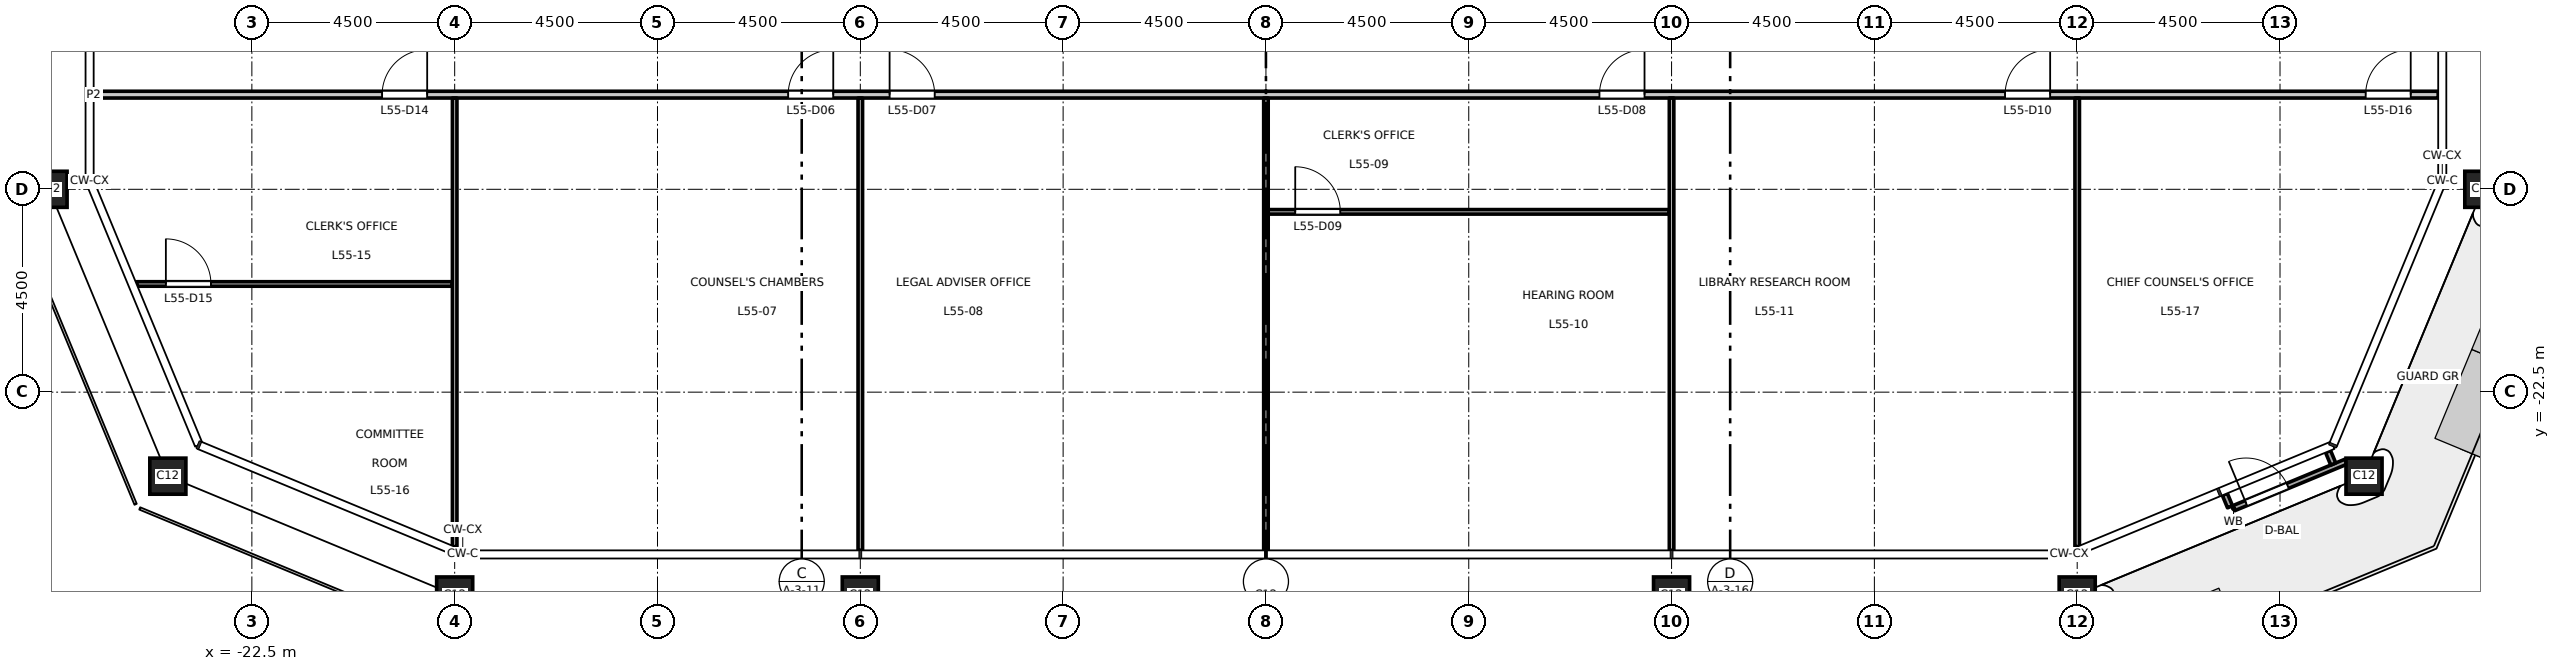
"""IFC4 building model, lengths in metres.
Left out: names, types, materials, properties, quantities, classifications, styles, units other than length and angle.
Written with IfcOpenShell. Run it as: python <this file> out.ifc"""

import sys

from ifc_helpers import new_model, si_unit, direction, frame, frame_2d, origin, origin_2d, place, context, subcontext, project, spatial, rectangle, hollow_rectangle, extrude, element, fill, save


model = new_model("IFC4")
c1 = context("Model", 3, precision=1e-05, world=origin(), true_north=direction((0.0, 1.0)))
c2 = subcontext(c1, "Body", "Model", "MODEL_VIEW")
j1 = project(units=[si_unit("LENGTHUNIT", "METRE"), si_unit("PLANEANGLEUNIT", "RADIAN")], contexts=[c1])
p1 = place(None, origin())
s1 = spatial("IfcSite", under=j1, at=p1, CompositionType="ELEMENT")
p2 = place(p1, origin())
s2 = spatial("IfcBuilding", under=s1, at=p2, CompositionType="ELEMENT")
p3 = place(p2, frame((0.0, 0.0, 255.7)))
s3 = spatial("IfcBuildingStorey", under=s2, at=p3, CompositionType="ELEMENT", Elevation=255.7)
for number, where, z_axis, x_axis in (
    (1, (-18.0, -27.0, 0.0), (0.0, 0.0, 1.0), (1.0, 0.0, 0.0)),
    (2, (-9.0, -27.0, 0.0), (0.0, 0.0, 1.0), (1.0, 0.0, 0.0)),
    (3, (0.0, -27.0, 0.0), (0.0, 0.0, 1.0), (1.0, 0.0, 0.0)),
    (4, (9.0, -27.0, 0.0), (0.0, 0.0, 1.0), (1.0, 0.0, 0.0)),
    (5, (18.0, -27.0, 0.0), (0.0, 0.0, 1.0), (1.0, 0.0, 0.0)),
    (6, (24.364, -24.364, 0.0), (0.0, 0.0, 1.0), (1.0, 0.0, 0.0)),
    (7, (27.0, -18.0, 0.0), (0.0, 0.0, 1.0), (1.0, 0.0, 0.0)),
    (8, (-27.0, -18.0, 0.0), (0.0, 0.0, 1.0), (1.0, 0.0, 0.0)),
    (9, (-24.364, -24.364, 0.0), (0.0, 0.0, 1.0), (1.0, 0.0, 0.0)),
):
    element("IfcColumn", number, at=place(p3, frame(where, z_axis=z_axis, x_axis=x_axis)), inside=s3, PredefinedType="COLUMN", context=c2, shape_type="SweptSolid", body=[
        extrude(hollow_rectangle(XDim=0.8, YDim=0.8, WallThickness=0.045, at=origin_2d()), origin(), (0.0, 0.0, 1.0), 4.5),
    ])
p4 = place(p3, frame((21.276, -24.766, 0.0), z_axis=(0.0, 0.0, 1.0), x_axis=(0.382591441855, -0.923917630863, 0.0)))
e10 = element("IfcWall", 10, at=p4, inside=s3, PredefinedType="STANDARD", context=c2, shape_type="SweptSolid", body=[
    extrude(rectangle(XDim=0.3, YDim=0.12, at=frame_2d((0.15, 0.0))), origin(), (0.0, 0.0, 1.0), 4.35),
])
p5 = place(p3, frame((23.566, -23.818, 0.0), z_axis=(0.0, 0.0, 1.0), x_axis=(0.383285987724, -0.923629715641, 0.0)))
e11 = element("IfcWall", 11, at=p5, inside=s3, PredefinedType="STANDARD", context=c2, shape_type="SweptSolid", body=[
    extrude(rectangle(XDim=0.3, YDim=0.12, at=frame_2d((0.15, 0.0))), origin(), (0.0, 0.0, 1.0), 4.35),
])
p6 = place(p3, frame((21.469, -25.076, 0.0), z_axis=(0.0, 0.0, 1.0), x_axis=(0.923874686516, 0.382695131424, 0.0)))
e12 = element("IfcWall", 12, at=p6, inside=s3, PredefinedType="STANDARD", context=c2, shape_type="SweptSolid", body=[
    extrude(rectangle(XDim=2.7, YDim=0.12, at=frame_2d((1.35, 0.0))), origin(), (0.0, 0.0, 1.0), 4.35),
])
p7 = place(p6, frame((0.3, 0.0, 0.0)))
e13 = element("IfcOpeningElement", 13, at=p7, cuts=e12, PredefinedType="OPENING", context=c2, shape_type="SweptSolid", body=[
    extrude(rectangle(XDim=1.0, YDim=2.4, at=frame_2d((0.5, 1.2))), frame((0.0, 0.07, 0.0), z_axis=(0.0, -1.0, 0.0), x_axis=(1.0, 0.0, 0.0)), (0.0, 0.0, 1.0), 0.14),
])
p8 = place(p3, frame((-25.058, -20.1, 0.0), z_axis=(0.0, 0.0, 1.0), x_axis=(1.0, 0.0, 0.0)))
e14 = element("IfcWall", 14, at=p8, inside=s3, PredefinedType="PARTITIONING", context=c2, shape_type="SweptSolid", body=[
    extrude(rectangle(XDim=7.008, YDim=0.1, at=frame_2d((3.504, 0.0))), origin(), (0.0, 0.0, 1.0), 4.35),
])
p9 = place(p8, frame((0.65, 0.0, 0.0)))
e15 = element("IfcOpeningElement", 15, at=p9, cuts=e14, PredefinedType="OPENING", context=c2, shape_type="SweptSolid", body=[
    extrude(rectangle(XDim=1.0, YDim=2.1, at=frame_2d((0.5, 1.05))), frame((0.0, 0.06, 0.0), z_axis=(0.0, -1.0, 0.0), x_axis=(1.0, 0.0, 0.0)), (0.0, 0.0, 1.0), 0.12),
])
p10 = place(p3, frame((0.05, -18.5, 0.0), z_axis=(0.0, 0.0, 1.0), x_axis=(1.0, 0.0, 0.0)))
e16 = element("IfcWall", 16, at=p10, inside=s3, PredefinedType="PARTITIONING", context=c2, shape_type="SweptSolid", body=[
    extrude(rectangle(XDim=8.9, YDim=0.1, at=frame_2d((4.45, 0.0))), origin(), (0.0, 0.0, 1.0), 4.35),
])
p11 = place(p10, frame((0.6, 0.0, 0.0)))
e17 = element("IfcOpeningElement", 17, at=p11, cuts=e16, PredefinedType="OPENING", context=c2, shape_type="SweptSolid", body=[
    extrude(rectangle(XDim=1.0, YDim=2.1, at=frame_2d((0.5, 1.05))), frame((0.0, 0.06, 0.0), z_axis=(0.0, -1.0, 0.0), x_axis=(1.0, 0.0, 0.0)), (0.0, 0.0, 1.0), 0.12),
])
p12 = place(p3, frame((-26.01, -15.9, 0.0), z_axis=(0.0, 0.0, 1.0), x_axis=(1.0, 0.0, 0.0)))
e18 = element("IfcWall", 18, at=p12, inside=s3, PredefinedType="PARTITIONING", context=c2, shape_type="SweptSolid", body=[
    extrude(rectangle(XDim=52.02, YDim=0.15, at=frame_2d((26.01, 0.0))), origin(), (0.0, 0.0, 1.0), 4.35),
])
p13 = place(p12, frame((15.41, 0.0, 0.0)))
e19 = element("IfcOpeningElement", 19, at=p13, cuts=e18, PredefinedType="OPENING", context=c2, shape_type="SweptSolid", body=[
    extrude(rectangle(XDim=1.0, YDim=2.1, at=frame_2d((0.5, 1.05))), frame((0.0, 0.085, 0.0), z_axis=(0.0, -1.0, 0.0), x_axis=(1.0, 0.0, 0.0)), (0.0, 0.0, 1.0), 0.17),
])
p14 = place(p12, frame((17.66, 0.0, 0.0)))
e20 = element("IfcOpeningElement", 20, at=p14, cuts=e18, PredefinedType="OPENING", context=c2, shape_type="SweptSolid", body=[
    extrude(rectangle(XDim=1.0, YDim=2.1, at=frame_2d((0.5, 1.05))), frame((0.0, 0.085, 0.0), z_axis=(0.0, -1.0, 0.0), x_axis=(1.0, 0.0, 0.0)), (0.0, 0.0, 1.0), 0.17),
])
p15 = place(p12, frame((33.41, 0.0, 0.0)))
e21 = element("IfcOpeningElement", 21, at=p15, cuts=e18, PredefinedType="OPENING", context=c2, shape_type="SweptSolid", body=[
    extrude(rectangle(XDim=1.0, YDim=2.1, at=frame_2d((0.5, 1.05))), frame((0.0, 0.085, 0.0), z_axis=(0.0, -1.0, 0.0), x_axis=(1.0, 0.0, 0.0)), (0.0, 0.0, 1.0), 0.17),
])
p16 = place(p12, frame((42.41, 0.0, 0.0)))
e22 = element("IfcOpeningElement", 22, at=p16, cuts=e18, PredefinedType="OPENING", context=c2, shape_type="SweptSolid", body=[
    extrude(rectangle(XDim=1.0, YDim=2.1, at=frame_2d((0.5, 1.05))), frame((0.0, 0.085, 0.0), z_axis=(0.0, -1.0, 0.0), x_axis=(1.0, 0.0, 0.0)), (0.0, 0.0, 1.0), 0.17),
])
p17 = place(p12, frame((6.4, 0.0, 0.0)))
e23 = element("IfcOpeningElement", 23, at=p17, cuts=e18, PredefinedType="OPENING", context=c2, shape_type="SweptSolid", body=[
    extrude(rectangle(XDim=1.0, YDim=2.1, at=frame_2d((0.5, 1.05))), frame((0.0, 0.085, 0.0), z_axis=(0.0, -1.0, 0.0), x_axis=(1.0, 0.0, 0.0)), (0.0, 0.0, 1.0), 0.17),
])
p18 = place(p12, frame((50.41, 0.0, 0.0)))
e24 = element("IfcOpeningElement", 24, at=p18, cuts=e18, PredefinedType="OPENING", context=c2, shape_type="SweptSolid", body=[
    extrude(rectangle(XDim=1.0, YDim=2.1, at=frame_2d((0.5, 1.05))), frame((0.0, 0.085, 0.0), z_axis=(0.0, -1.0, 0.0), x_axis=(1.0, 0.0, 0.0)), (0.0, 0.0, 1.0), 0.17),
])
p19 = place(p3, frame((-18.0, -25.928, 0.0), z_axis=(0.0, 0.0, 1.0), x_axis=(0.0, 1.0, 0.0)))
e25 = element("IfcWall", 25, at=p19, inside=s3, PredefinedType="PARTITIONING", context=c2, shape_type="SweptSolid", body=[
    extrude(rectangle(XDim=9.953, YDim=0.1, at=frame_2d((4.977, 0.0))), origin(), (0.0, 0.0, 1.0), 3.65),
])
p20 = place(p3, frame((-9.0, -26.01, 0.0), z_axis=(0.0, 0.0, 1.0), x_axis=(0.0, 1.0, 0.0)))
e26 = element("IfcWall", 26, at=p20, inside=s3, PredefinedType="PARTITIONING", context=c2, shape_type="SweptSolid", body=[
    extrude(rectangle(XDim=10.035, YDim=0.1, at=frame_2d((5.018, 0.0))), origin(), (0.0, 0.0, 1.0), 3.65),
])
p21 = place(p3, frame((0.0, -26.01, 0.0), z_axis=(0.0, 0.0, 1.0), x_axis=(0.0, 1.0, 0.0)))
e27 = element("IfcWall", 27, at=p21, inside=s3, PredefinedType="PARTITIONING", context=c2, shape_type="SweptSolid", body=[
    extrude(rectangle(XDim=10.035, YDim=0.1, at=frame_2d((5.018, 0.0))), origin(), (0.0, 0.0, 1.0), 3.55),
])
p22 = place(p3, frame((9.0, -26.01, 0.0), z_axis=(0.0, 0.0, 1.0), x_axis=(0.0, 1.0, 0.0)))
e28 = element("IfcWall", 28, at=p22, inside=s3, PredefinedType="PARTITIONING", context=c2, shape_type="SweptSolid", body=[
    extrude(rectangle(XDim=10.035, YDim=0.1, at=frame_2d((5.018, 0.0))), origin(), (0.0, 0.0, 1.0), 3.65),
])
p23 = place(p3, frame((18.0, -25.928, 0.0), z_axis=(0.0, 0.0, 1.0), x_axis=(0.0, 1.0, 0.0)))
e29 = element("IfcWall", 29, at=p23, inside=s3, PredefinedType="PARTITIONING", context=c2, shape_type="SweptSolid", body=[
    extrude(rectangle(XDim=9.953, YDim=0.1, at=frame_2d((4.977, 0.0))), origin(), (0.0, 0.0, 1.0), 3.65),
])
p24 = place(p7, origin())
e30 = element("IfcDoor", 30, at=p24, inside=s3, OperationType="SINGLE_SWING_LEFT", PredefinedType="DOOR", context=c2, shape_type="SweptSolid", body=[
    extrude(rectangle(XDim=1.0, YDim=2.4, at=frame_2d((0.5, 1.2))), frame((0.0, 0.025, 0.0), z_axis=(0.0, -1.0, 0.0), x_axis=(1.0, 0.0, 0.0)), (0.0, 0.0, 1.0), 0.05),
])
fill(e13, e30)
p25 = place(p13, origin())
e31 = element("IfcDoor", 31, at=p25, inside=s3, OperationType="SINGLE_SWING_RIGHT", PredefinedType="DOOR", context=c2, shape_type="SweptSolid", body=[
    extrude(rectangle(XDim=1.0, YDim=2.1, at=frame_2d((0.5, 1.05))), frame((0.0, 0.025, 0.0), z_axis=(0.0, -1.0, 0.0), x_axis=(1.0, 0.0, 0.0)), (0.0, 0.0, 1.0), 0.05),
])
fill(e19, e31)
p26 = place(p14, origin())
e32 = element("IfcDoor", 32, at=p26, inside=s3, OperationType="SINGLE_SWING_LEFT", PredefinedType="DOOR", context=c2, shape_type="SweptSolid", body=[
    extrude(rectangle(XDim=1.0, YDim=2.1, at=frame_2d((0.5, 1.05))), frame((0.0, 0.025, 0.0), z_axis=(0.0, -1.0, 0.0), x_axis=(1.0, 0.0, 0.0)), (0.0, 0.0, 1.0), 0.05),
])
fill(e20, e32)
p27 = place(p15, origin())
e33 = element("IfcDoor", 33, at=p27, inside=s3, OperationType="SINGLE_SWING_RIGHT", PredefinedType="DOOR", context=c2, shape_type="SweptSolid", body=[
    extrude(rectangle(XDim=1.0, YDim=2.1, at=frame_2d((0.5, 1.05))), frame((0.0, 0.025, 0.0), z_axis=(0.0, -1.0, 0.0), x_axis=(1.0, 0.0, 0.0)), (0.0, 0.0, 1.0), 0.05),
])
fill(e21, e33)
p28 = place(p11, origin())
e34 = element("IfcDoor", 34, at=p28, inside=s3, OperationType="SINGLE_SWING_LEFT", PredefinedType="DOOR", context=c2, shape_type="SweptSolid", body=[
    extrude(rectangle(XDim=1.0, YDim=2.1, at=frame_2d((0.5, 1.05))), frame((0.0, 0.025, 0.0), z_axis=(0.0, -1.0, 0.0), x_axis=(1.0, 0.0, 0.0)), (0.0, 0.0, 1.0), 0.05),
])
fill(e17, e34)
p29 = place(p16, origin())
e35 = element("IfcDoor", 35, at=p29, inside=s3, OperationType="SINGLE_SWING_RIGHT", PredefinedType="DOOR", context=c2, shape_type="SweptSolid", body=[
    extrude(rectangle(XDim=1.0, YDim=2.1, at=frame_2d((0.5, 1.05))), frame((0.0, 0.025, 0.0), z_axis=(0.0, -1.0, 0.0), x_axis=(1.0, 0.0, 0.0)), (0.0, 0.0, 1.0), 0.05),
])
fill(e22, e35)
p30 = place(p17, origin())
e36 = element("IfcDoor", 36, at=p30, inside=s3, OperationType="SINGLE_SWING_RIGHT", PredefinedType="DOOR", context=c2, shape_type="SweptSolid", body=[
    extrude(rectangle(XDim=1.0, YDim=2.1, at=frame_2d((0.5, 1.05))), frame((0.0, 0.025, 0.0), z_axis=(0.0, -1.0, 0.0), x_axis=(1.0, 0.0, 0.0)), (0.0, 0.0, 1.0), 0.05),
])
fill(e23, e36)
p31 = place(p9, origin())
e37 = element("IfcDoor", 37, at=p31, inside=s3, OperationType="SINGLE_SWING_LEFT", PredefinedType="DOOR", context=c2, shape_type="SweptSolid", body=[
    extrude(rectangle(XDim=1.0, YDim=2.1, at=frame_2d((0.5, 1.05))), frame((0.0, 0.025, 0.0), z_axis=(0.0, -1.0, 0.0), x_axis=(1.0, 0.0, 0.0)), (0.0, 0.0, 1.0), 0.05),
])
fill(e15, e37)
p32 = place(p18, origin())
e38 = element("IfcDoor", 38, at=p32, inside=s3, OperationType="SINGLE_SWING_RIGHT", PredefinedType="DOOR", context=c2, shape_type="SweptSolid", body=[
    extrude(rectangle(XDim=1.0, YDim=2.1, at=frame_2d((0.5, 1.05))), frame((0.0, 0.025, 0.0), z_axis=(0.0, -1.0, 0.0), x_axis=(1.0, 0.0, 0.0)), (0.0, 0.0, 1.0), 0.05),
])
fill(e24, e38)
save(model, sys.argv[1])
